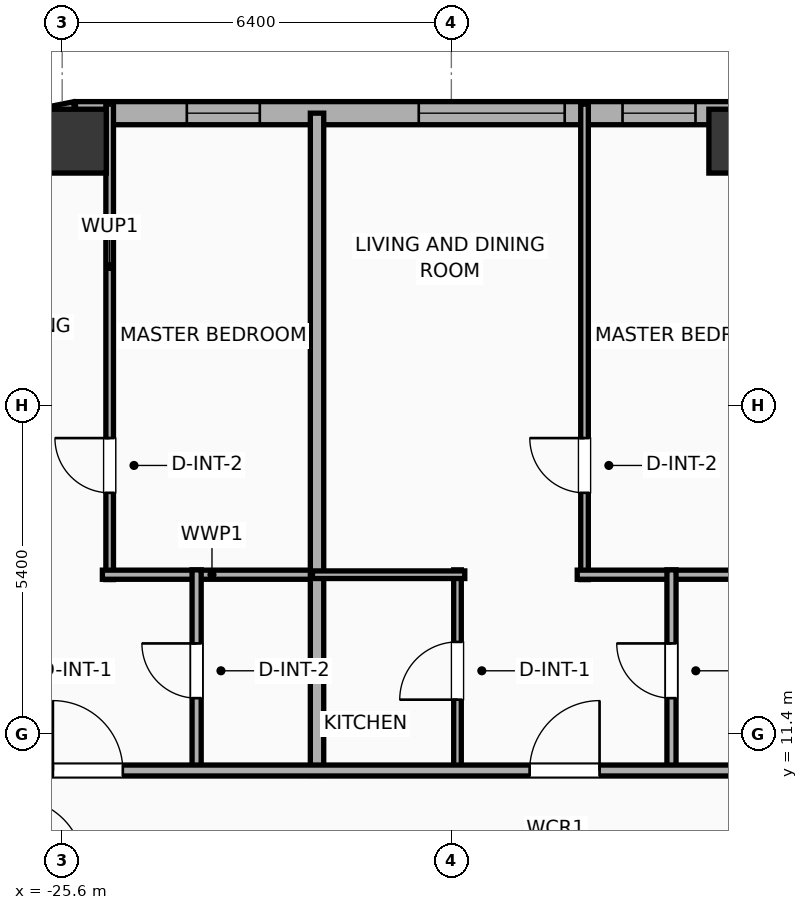
"""IFC4 building model, lengths in metres.
Left out: names, types, materials, properties, quantities, classifications, styles, units other than length and angle.
Written with IfcOpenShell. Run it as: python <this file> out.ifc"""

import sys

from ifc_helpers import new_model, si_unit, direction, frame, frame_2d, origin, origin_2d, place, context, subcontext, project, spatial, rectangle, hollow_rectangle, extrude, element, fill, save


model = new_model("IFC4")
c1 = context("Model", 3, precision=1e-05, world=origin(), true_north=direction((0.0, 1.0)))
c2 = subcontext(c1, "Body", "Model", "MODEL_VIEW")
j1 = project(units=[si_unit("LENGTHUNIT", "METRE"), si_unit("PLANEANGLEUNIT", "RADIAN")], contexts=[c1])
p1 = place(None, origin())
s1 = spatial("IfcSite", under=j1, at=p1, CompositionType="ELEMENT")
p2 = place(p1, origin())
s2 = spatial("IfcBuilding", under=s1, at=p2, CompositionType="ELEMENT")
p3 = place(p2, frame((0.0, 0.0, 109.2)))
s3 = spatial("IfcBuildingStorey", under=s2, at=p3, CompositionType="ELEMENT", Elevation=109.2)
for number, where, z_axis, x_axis in (
    (1, (-14.44, 21.15, 0.0), (0.0, 0.0, 1.0), (1.0, 0.0, 0.0)),
    (2, (-25.4, 21.15, 0.0), (0.0, 0.0, 1.0), (1.0, 0.0, 0.0)),
):
    element("IfcColumn", number, at=place(p3, frame(where, z_axis=z_axis, x_axis=x_axis)), inside=s3, PredefinedType="COLUMN", context=c2, shape_type="SweptSolid", body=[
        extrude(hollow_rectangle(XDim=1.05, YDim=1.05, WallThickness=0.036, at=origin_2d()), origin(), (0.0, 0.0, 1.0), 3.9),
    ])
p4 = place(p3, frame((-26.857, 21.316, 0.0), z_axis=(0.0, 0.0, 1.0), x_axis=(0.980755066645, 0.195242155415, 0.0)))
e3 = element("IfcWall", 3, at=p4, inside=s3, PredefinedType="ELEMENTEDWALL", context=c2, shape_type="SweptSolid", body=[
    extrude(rectangle(XDim=1.504, YDim=0.38, at=frame_2d((0.752, 0.0))), origin(), (0.0, 0.0, 1.0), 3.65),
])
p5 = place(p3, frame((-25.381, 21.61, 0.0), z_axis=(0.0, 0.0, 1.0), x_axis=(1.0, 0.0, 0.0)))
e4 = element("IfcWall", 4, at=p5, inside=s3, PredefinedType="ELEMENTEDWALL", context=c2, shape_type="SweptSolid", body=[
    extrude(rectangle(XDim=54.763, YDim=0.38, at=frame_2d((27.381, 0.0))), origin(), (0.0, 0.0, 1.0), 3.65),
])
p6 = place(p5, frame((5.645, 0.0, 0.75)))
e5 = element("IfcOpeningElement", 5, at=p6, cuts=e4, PredefinedType="OPENING", context=c2, shape_type="SweptSolid", body=[
    extrude(rectangle(XDim=2.4, YDim=2.1, at=frame_2d((1.2, 1.05))), frame((0.0, 0.2, 0.0), z_axis=(0.0, -1.0, 0.0), x_axis=(1.0, 0.0, 0.0)), (0.0, 0.0, 1.0), 0.4),
])
p7 = place(p5, frame((45.067, 0.0, 0.75)))
e6 = element("IfcOpeningElement", 6, at=p7, cuts=e4, PredefinedType="OPENING", context=c2, shape_type="SweptSolid", body=[
    extrude(rectangle(XDim=2.4, YDim=2.1, at=frame_2d((1.2, 1.05))), frame((0.0, 0.2, 0.0), z_axis=(0.0, -1.0, 0.0), x_axis=(1.0, 0.0, 0.0)), (0.0, 0.0, 1.0), 0.4),
])
p8 = place(p5, frame((1.831, 0.0, 0.75)))
e7 = element("IfcOpeningElement", 7, at=p8, cuts=e4, PredefinedType="OPENING", context=c2, shape_type="SweptSolid", body=[
    extrude(rectangle(XDim=1.2, YDim=2.05, at=frame_2d((0.6, 1.025))), frame((0.0, 0.2, 0.0), z_axis=(0.0, -1.0, 0.0), x_axis=(1.0, 0.0, 0.0)), (0.0, 0.0, 1.0), 0.4),
])
p9 = place(p5, frame((8.996, 0.0, 0.75)))
e8 = element("IfcOpeningElement", 8, at=p9, cuts=e4, PredefinedType="OPENING", context=c2, shape_type="SweptSolid", body=[
    extrude(rectangle(XDim=1.2, YDim=2.05, at=frame_2d((0.6, 1.025))), frame((0.0, 0.2, 0.0), z_axis=(0.0, -1.0, 0.0), x_axis=(1.0, 0.0, 0.0)), (0.0, 0.0, 1.0), 0.4),
])
p10 = place(p5, frame((15.102, 0.0, 0.75)))
e9 = element("IfcOpeningElement", 9, at=p10, cuts=e4, PredefinedType="OPENING", context=c2, shape_type="SweptSolid", body=[
    extrude(rectangle(XDim=1.2, YDim=2.05, at=frame_2d((0.6, 1.025))), frame((0.0, 0.2, 0.0), z_axis=(0.0, -1.0, 0.0), x_axis=(1.0, 0.0, 0.0)), (0.0, 0.0, 1.0), 0.4),
])
p11 = place(p5, frame((12.352, 0.0, 0.75)))
e10 = element("IfcOpeningElement", 10, at=p11, cuts=e4, PredefinedType="OPENING", context=c2, shape_type="SweptSolid", body=[
    extrude(rectangle(XDim=1.2, YDim=2.05, at=frame_2d((0.6, 1.025))), frame((0.0, 0.2, 0.0), z_axis=(0.0, -1.0, 0.0), x_axis=(1.0, 0.0, 0.0)), (0.0, 0.0, 1.0), 0.4),
])
p12 = place(p5, frame((19.936, 0.0, 0.75)))
e11 = element("IfcOpeningElement", 11, at=p12, cuts=e4, PredefinedType="OPENING", context=c2, shape_type="SweptSolid", body=[
    extrude(rectangle(XDim=1.2, YDim=2.05, at=frame_2d((0.6, 1.025))), frame((0.0, 0.2, 0.0), z_axis=(0.0, -1.0, 0.0), x_axis=(1.0, 0.0, 0.0)), (0.0, 0.0, 1.0), 0.4),
])
p13 = place(p5, frame((17.786, 0.0, 0.75)))
e12 = element("IfcOpeningElement", 12, at=p13, cuts=e4, PredefinedType="OPENING", context=c2, shape_type="SweptSolid", body=[
    extrude(rectangle(XDim=1.2, YDim=2.05, at=frame_2d((0.6, 1.025))), frame((0.0, 0.2, 0.0), z_axis=(0.0, -1.0, 0.0), x_axis=(1.0, 0.0, 0.0)), (0.0, 0.0, 1.0), 0.4),
])
p14 = place(p5, frame((23.826, 0.0, 0.75)))
e13 = element("IfcOpeningElement", 13, at=p14, cuts=e4, PredefinedType="OPENING", context=c2, shape_type="SweptSolid", body=[
    extrude(rectangle(XDim=1.2, YDim=2.05, at=frame_2d((0.6, 1.025))), frame((0.0, 0.2, 0.0), z_axis=(0.0, -1.0, 0.0), x_axis=(1.0, 0.0, 0.0)), (0.0, 0.0, 1.0), 0.4),
])
p15 = place(p5, frame((26.576, 0.0, 0.75)))
e14 = element("IfcOpeningElement", 14, at=p15, cuts=e4, PredefinedType="OPENING", context=c2, shape_type="SweptSolid", body=[
    extrude(rectangle(XDim=1.2, YDim=2.05, at=frame_2d((0.6, 1.025))), frame((0.0, 0.2, 0.0), z_axis=(0.0, -1.0, 0.0), x_axis=(1.0, 0.0, 0.0)), (0.0, 0.0, 1.0), 0.4),
])
p16 = place(p5, frame((30.431, 0.0, 0.75)))
e15 = element("IfcOpeningElement", 15, at=p16, cuts=e4, PredefinedType="OPENING", context=c2, shape_type="SweptSolid", body=[
    extrude(rectangle(XDim=1.2, YDim=2.05, at=frame_2d((0.6, 1.025))), frame((0.0, 0.2, 0.0), z_axis=(0.0, -1.0, 0.0), x_axis=(1.0, 0.0, 0.0)), (0.0, 0.0, 1.0), 0.4),
])
p17 = place(p5, frame((38.581, 0.0, 0.75)))
e16 = element("IfcOpeningElement", 16, at=p17, cuts=e4, PredefinedType="OPENING", context=c2, shape_type="SweptSolid", body=[
    extrude(rectangle(XDim=1.2, YDim=2.05, at=frame_2d((0.6, 1.025))), frame((0.0, 0.2, 0.0), z_axis=(0.0, -1.0, 0.0), x_axis=(1.0, 0.0, 0.0)), (0.0, 0.0, 1.0), 0.4),
])
p18 = place(p5, frame((34.786, 0.0, 0.75)))
e17 = element("IfcOpeningElement", 17, at=p18, cuts=e4, PredefinedType="OPENING", context=c2, shape_type="SweptSolid", body=[
    extrude(rectangle(XDim=1.2, YDim=2.05, at=frame_2d((0.6, 1.025))), frame((0.0, 0.2, 0.0), z_axis=(0.0, -1.0, 0.0), x_axis=(1.0, 0.0, 0.0)), (0.0, 0.0, 1.0), 0.4),
])
p19 = place(p5, frame((41.876, 0.0, 0.75)))
e18 = element("IfcOpeningElement", 18, at=p19, cuts=e4, PredefinedType="OPENING", context=c2, shape_type="SweptSolid", body=[
    extrude(rectangle(XDim=1.2, YDim=2.05, at=frame_2d((0.6, 1.025))), frame((0.0, 0.2, 0.0), z_axis=(0.0, -1.0, 0.0), x_axis=(1.0, 0.0, 0.0)), (0.0, 0.0, 1.0), 0.4),
])
p20 = place(p5, frame((49.385, 0.0, 0.75)))
e19 = element("IfcOpeningElement", 19, at=p20, cuts=e4, PredefinedType="OPENING", context=c2, shape_type="SweptSolid", body=[
    extrude(rectangle(XDim=1.2, YDim=2.05, at=frame_2d((0.6, 1.025))), frame((0.0, 0.2, 0.0), z_axis=(0.0, -1.0, 0.0), x_axis=(1.0, 0.0, 0.0)), (0.0, 0.0, 1.0), 0.4),
])
p21 = place(p5, frame((52.181, 0.0, 0.75)))
e20 = element("IfcOpeningElement", 20, at=p21, cuts=e4, PredefinedType="OPENING", context=c2, shape_type="SweptSolid", body=[
    extrude(rectangle(XDim=1.2, YDim=2.05, at=frame_2d((0.6, 1.025))), frame((0.0, 0.2, 0.0), z_axis=(0.0, -1.0, 0.0), x_axis=(1.0, 0.0, 0.0)), (0.0, 0.0, 1.0), 0.4),
])
p22 = place(p3, frame((-24.819, 13.94, 0.0), z_axis=(0.0, 0.0, 1.0), x_axis=(0.0, 1.0, 0.0)))
e21 = element("IfcWall", 21, at=p22, inside=s3, PredefinedType="PARTITIONING", context=c2, shape_type="SweptSolid", body=[
    extrude(rectangle(XDim=7.82, YDim=0.125, at=frame_2d((3.91, 0.0))), origin(), (0.0, 0.0, 1.0), 3.65),
])
p23 = place(p22, frame((1.427, 0.0, 0.0)))
e22 = element("IfcOpeningElement", 22, at=p23, cuts=e21, PredefinedType="OPENING", context=c2, shape_type="SweptSolid", body=[
    extrude(rectangle(XDim=0.9, YDim=2.05, at=frame_2d((0.45, 1.025))), frame((0.0, 0.073, 0.0), z_axis=(0.0, -1.0, 0.0), x_axis=(1.0, 0.0, 0.0)), (0.0, 0.0, 1.0), 0.145),
])
p24 = place(p3, frame((-24.939, 14.02, 0.0), z_axis=(0.0, 0.0, 1.0), x_axis=(1.0, 0.0, 0.0)))
e23 = element("IfcWall", 23, at=p24, inside=s3, PredefinedType="PLUMBINGWALL", context=c2, shape_type="SweptSolid", body=[
    extrude(rectangle(XDim=3.605, YDim=0.15, at=frame_2d((1.802, 0.0))), origin(), (0.0, 0.0, 1.0), 3.65),
])
p25 = place(p3, frame((-23.389, 10.78, 0.0), z_axis=(0.0, 0.0, 1.0), x_axis=(0.0, 1.0, 0.0)))
e24 = element("IfcWall", 24, at=p25, inside=s3, PredefinedType="PLUMBINGWALL", context=c2, shape_type="SweptSolid", body=[
    extrude(rectangle(XDim=3.32, YDim=0.15, at=frame_2d((1.66, 0.0))), origin(), (0.0, 0.0, 1.0), 3.65),
])
p26 = place(p25, frame((1.21, 0.0, 0.0)))
e25 = element("IfcOpeningElement", 25, at=p26, cuts=e24, PredefinedType="OPENING", context=c2, shape_type="SweptSolid", body=[
    extrude(rectangle(XDim=0.9, YDim=2.05, at=frame_2d((0.45, 1.025))), frame((0.0, 0.085, 0.0), z_axis=(0.0, -1.0, 0.0), x_axis=(1.0, 0.0, 0.0)), (0.0, 0.0, 1.0), 0.17),
])
p27 = place(p3, frame((-21.409, 10.72, 0.0), z_axis=(0.0, 0.0, 1.0), x_axis=(0.0, 1.0, 0.0)))
e26 = element("IfcWall", 26, at=p27, inside=s3, PredefinedType="PARTITIONING", context=c2, shape_type="SweptSolid", body=[
    extrude(rectangle(XDim=10.89, YDim=0.22, at=frame_2d((5.445, 0.0))), origin(), (0.0, 0.0, 1.0), 3.65),
])
p28 = place(p3, frame((-17.01, 13.94, 0.0), z_axis=(0.0, 0.0, 1.0), x_axis=(0.0, 1.0, 0.0)))
e27 = element("IfcWall", 27, at=p28, inside=s3, PredefinedType="PARTITIONING", context=c2, shape_type="SweptSolid", body=[
    extrude(rectangle(XDim=7.82, YDim=0.125, at=frame_2d((3.91, 0.0))), origin(), (0.0, 0.0, 1.0), 3.65),
])
p29 = place(p28, frame((1.427, 0.0, 0.0)))
e28 = element("IfcOpeningElement", 28, at=p29, cuts=e27, PredefinedType="OPENING", context=c2, shape_type="SweptSolid", body=[
    extrude(rectangle(XDim=0.9, YDim=2.05, at=frame_2d((0.45, 1.025))), frame((0.0, 0.073, 0.0), z_axis=(0.0, -1.0, 0.0), x_axis=(1.0, 0.0, 0.0)), (0.0, 0.0, 1.0), 0.145),
])
p30 = place(p3, frame((-17.13, 14.02, 0.0), z_axis=(0.0, 0.0, 1.0), x_axis=(1.0, 0.0, 0.0)))
e29 = element("IfcWall", 29, at=p30, inside=s3, PredefinedType="PLUMBINGWALL", context=c2, shape_type="SweptSolid", body=[
    extrude(rectangle(XDim=3.79, YDim=0.15, at=frame_2d((1.895, 0.0))), origin(), (0.0, 0.0, 1.0), 3.65),
])
p31 = place(p3, frame((-19.099, 10.78, 0.0), z_axis=(0.0, 0.0, 1.0), x_axis=(0.0, 1.0, 0.0)))
e30 = element("IfcWall", 30, at=p31, inside=s3, PredefinedType="PARTITIONING", context=c2, shape_type="SweptSolid", body=[
    extrude(rectangle(XDim=3.32, YDim=0.125, at=frame_2d((1.66, 0.0))), origin(), (0.0, 0.0, 1.0), 3.65),
])
p32 = place(p31, frame((1.185, 0.0, 0.0)))
e31 = element("IfcOpeningElement", 31, at=p32, cuts=e30, PredefinedType="OPENING", context=c2, shape_type="SweptSolid", body=[
    extrude(rectangle(XDim=0.95, YDim=2.05, at=frame_2d((0.475, 1.025))), frame((0.0, 0.073, 0.0), z_axis=(0.0, -1.0, 0.0), x_axis=(1.0, 0.0, 0.0)), (0.0, 0.0, 1.0), 0.145),
])
p33 = place(p3, frame((-21.484, 14.02, 0.0), z_axis=(0.0, 0.0, 1.0), x_axis=(1.0, 0.0, 0.0)))
e32 = element("IfcWall", 32, at=p33, inside=s3, PredefinedType="PARTITIONING", context=c2, shape_type="SweptSolid", body=[
    extrude(rectangle(XDim=2.505, YDim=0.125, at=frame_2d((1.252, 0.0))), origin(), (0.0, 0.0, 1.0), 3.65),
])
p34 = place(p3, frame((-15.58, 10.78, 0.0), z_axis=(0.0, 0.0, 1.0), x_axis=(0.0, 1.0, 0.0)))
e33 = element("IfcWall", 33, at=p34, inside=s3, PredefinedType="PLUMBINGWALL", context=c2, shape_type="SweptSolid", body=[
    extrude(rectangle(XDim=3.32, YDim=0.15, at=frame_2d((1.66, 0.0))), origin(), (0.0, 0.0, 1.0), 3.65),
])
p35 = place(p34, frame((1.21, 0.0, 0.0)))
e34 = element("IfcOpeningElement", 34, at=p35, cuts=e33, PredefinedType="OPENING", context=c2, shape_type="SweptSolid", body=[
    extrude(rectangle(XDim=0.9, YDim=2.05, at=frame_2d((0.45, 1.025))), frame((0.0, 0.085, 0.0), z_axis=(0.0, -1.0, 0.0), x_axis=(1.0, 0.0, 0.0)), (0.0, 0.0, 1.0), 0.17),
])
p36 = place(p3, frame((-29.21, 10.8, 0.0), z_axis=(0.0, 0.0, 1.0), x_axis=(1.0, 0.0, 0.0)))
e35 = element("IfcWall", 35, at=p36, inside=s3, PredefinedType="PARTITIONING", context=c2, shape_type="SweptSolid", body=[
    extrude(rectangle(XDim=62.42, YDim=0.18, at=frame_2d((31.21, 0.0))), origin(), (0.0, 0.0, 1.0), 3.65),
])
p37 = place(p36, frame((3.457, 0.0, 0.0)))
e36 = element("IfcOpeningElement", 36, at=p37, cuts=e35, PredefinedType="OPENING", context=c2, shape_type="SweptSolid", body=[
    extrude(rectangle(XDim=1.15, YDim=2.05, at=frame_2d((0.575, 1.025))), frame((0.0, 0.1, 0.0), z_axis=(0.0, -1.0, 0.0), x_axis=(1.0, 0.0, 0.0)), (0.0, 0.0, 1.0), 0.2),
])
p38 = place(p36, frame((11.297, 0.0, 0.0)))
e37 = element("IfcOpeningElement", 37, at=p38, cuts=e35, PredefinedType="OPENING", context=c2, shape_type="SweptSolid", body=[
    extrude(rectangle(XDim=1.15, YDim=2.05, at=frame_2d((0.575, 1.025))), frame((0.0, 0.1, 0.0), z_axis=(0.0, -1.0, 0.0), x_axis=(1.0, 0.0, 0.0)), (0.0, 0.0, 1.0), 0.2),
])
p39 = place(p36, frame((18.925, 0.0, 0.0)))
e38 = element("IfcOpeningElement", 38, at=p39, cuts=e35, PredefinedType="OPENING", context=c2, shape_type="SweptSolid", body=[
    extrude(rectangle(XDim=1.15, YDim=2.05, at=frame_2d((0.575, 1.025))), frame((0.0, 0.1, 0.0), z_axis=(0.0, -1.0, 0.0), x_axis=(1.0, 0.0, 0.0)), (0.0, 0.0, 1.0), 0.2),
])
p40 = place(p36, frame((24.362, 0.0, 0.0)))
e39 = element("IfcOpeningElement", 39, at=p40, cuts=e35, PredefinedType="OPENING", context=c2, shape_type="SweptSolid", body=[
    extrude(rectangle(XDim=1.15, YDim=2.05, at=frame_2d((0.575, 1.025))), frame((0.0, 0.1, 0.0), z_axis=(0.0, -1.0, 0.0), x_axis=(1.0, 0.0, 0.0)), (0.0, 0.0, 1.0), 0.2),
])
p41 = place(p36, frame((27.708, 0.0, 0.0)))
e40 = element("IfcOpeningElement", 40, at=p41, cuts=e35, PredefinedType="OPENING", context=c2, shape_type="SweptSolid", body=[
    extrude(rectangle(XDim=1.15, YDim=2.05, at=frame_2d((0.575, 1.025))), frame((0.0, 0.1, 0.0), z_axis=(0.0, -1.0, 0.0), x_axis=(1.0, 0.0, 0.0)), (0.0, 0.0, 1.0), 0.2),
])
p42 = place(p36, frame((34.618, 0.0, 0.0)))
e41 = element("IfcOpeningElement", 41, at=p42, cuts=e35, PredefinedType="OPENING", context=c2, shape_type="SweptSolid", body=[
    extrude(rectangle(XDim=0.9, YDim=2.05, at=frame_2d((0.45, 1.025))), frame((0.0, 0.1, 0.0), z_axis=(0.0, -1.0, 0.0), x_axis=(1.0, 0.0, 0.0)), (0.0, 0.0, 1.0), 0.2),
])
p43 = place(p36, frame((43.106, 0.0, 0.0)))
e42 = element("IfcOpeningElement", 42, at=p43, cuts=e35, PredefinedType="OPENING", context=c2, shape_type="SweptSolid", body=[
    extrude(rectangle(XDim=1.15, YDim=2.05, at=frame_2d((0.575, 1.025))), frame((0.0, 0.1, 0.0), z_axis=(0.0, -1.0, 0.0), x_axis=(1.0, 0.0, 0.0)), (0.0, 0.0, 1.0), 0.2),
])
p44 = place(p36, frame((51.777, 0.0, 0.0)))
e43 = element("IfcOpeningElement", 43, at=p44, cuts=e35, PredefinedType="OPENING", context=c2, shape_type="SweptSolid", body=[
    extrude(rectangle(XDim=0.9, YDim=2.05, at=frame_2d((0.45, 1.025))), frame((0.0, 0.1, 0.0), z_axis=(0.0, -1.0, 0.0), x_axis=(1.0, 0.0, 0.0)), (0.0, 0.0, 1.0), 0.2),
])
p45 = place(p36, frame((58.718, 0.0, 0.0)))
e44 = element("IfcOpeningElement", 44, at=p45, cuts=e35, PredefinedType="OPENING", context=c2, shape_type="SweptSolid", body=[
    extrude(rectangle(XDim=0.9, YDim=2.05, at=frame_2d((0.45, 1.025))), frame((0.0, 0.1, 0.0), z_axis=(0.0, -1.0, 0.0), x_axis=(1.0, 0.0, 0.0)), (0.0, 0.0, 1.0), 0.2),
])
p46 = place(p6, origin())
e45 = element("IfcWindow", 45, at=p46, inside=s3, PartitioningType="SINGLE_PANEL", PredefinedType="WINDOW", context=c2, shape_type="SweptSolid", body=[
    extrude(rectangle(XDim=2.4, YDim=2.1, at=frame_2d((1.2, 1.05))), frame((0.0, 0.03, 0.0), z_axis=(0.0, -1.0, 0.0), x_axis=(1.0, 0.0, 0.0)), (0.0, 0.0, 1.0), 0.06),
])
fill(e5, e45)
p47 = place(p8, origin())
e46 = element("IfcWindow", 46, at=p47, inside=s3, PartitioningType="SINGLE_PANEL", PredefinedType="WINDOW", context=c2, shape_type="SweptSolid", body=[
    extrude(rectangle(XDim=1.2, YDim=2.05, at=frame_2d((0.6, 1.025))), frame((0.0, 0.03, 0.0), z_axis=(0.0, -1.0, 0.0), x_axis=(1.0, 0.0, 0.0)), (0.0, 0.0, 1.0), 0.06),
])
fill(e7, e46)
p48 = place(p9, origin())
e47 = element("IfcWindow", 47, at=p48, inside=s3, PartitioningType="SINGLE_PANEL", PredefinedType="WINDOW", context=c2, shape_type="SweptSolid", body=[
    extrude(rectangle(XDim=1.2, YDim=2.05, at=frame_2d((0.6, 1.025))), frame((0.0, 0.03, 0.0), z_axis=(0.0, -1.0, 0.0), x_axis=(1.0, 0.0, 0.0)), (0.0, 0.0, 1.0), 0.06),
])
fill(e8, e47)
p49 = place(p23, origin())
e48 = element("IfcDoor", 48, at=p49, inside=s3, OperationType="SINGLE_SWING_RIGHT", PredefinedType="DOOR", context=c2, shape_type="SweptSolid", body=[
    extrude(rectangle(XDim=0.9, YDim=2.05, at=frame_2d((0.45, 1.025))), frame((0.0, 0.025, 0.0), z_axis=(0.0, -1.0, 0.0), x_axis=(1.0, 0.0, 0.0)), (0.0, 0.0, 1.0), 0.05),
])
fill(e22, e48)
p50 = place(p26, origin())
e49 = element("IfcDoor", 49, at=p50, inside=s3, OperationType="SINGLE_SWING_RIGHT", PredefinedType="DOOR", context=c2, shape_type="SweptSolid", body=[
    extrude(rectangle(XDim=0.9, YDim=2.05, at=frame_2d((0.45, 1.025))), frame((0.0, 0.025, 0.0), z_axis=(0.0, -1.0, 0.0), x_axis=(1.0, 0.0, 0.0)), (0.0, 0.0, 1.0), 0.05),
])
fill(e25, e49)
p51 = place(p29, origin())
e50 = element("IfcDoor", 50, at=p51, inside=s3, OperationType="SINGLE_SWING_RIGHT", PredefinedType="DOOR", context=c2, shape_type="SweptSolid", body=[
    extrude(rectangle(XDim=0.9, YDim=2.05, at=frame_2d((0.45, 1.025))), frame((0.0, 0.025, 0.0), z_axis=(0.0, -1.0, 0.0), x_axis=(1.0, 0.0, 0.0)), (0.0, 0.0, 1.0), 0.05),
])
fill(e28, e50)
p52 = place(p32, origin())
e51 = element("IfcDoor", 51, at=p52, inside=s3, OperationType="SINGLE_SWING_LEFT", PredefinedType="DOOR", context=c2, shape_type="SweptSolid", body=[
    extrude(rectangle(XDim=0.95, YDim=2.05, at=frame_2d((0.475, 1.025))), frame((0.0, 0.025, 0.0), z_axis=(0.0, -1.0, 0.0), x_axis=(1.0, 0.0, 0.0)), (0.0, 0.0, 1.0), 0.05),
])
fill(e31, e51)
p53 = place(p35, origin())
e52 = element("IfcDoor", 52, at=p53, inside=s3, OperationType="SINGLE_SWING_RIGHT", PredefinedType="DOOR", context=c2, shape_type="SweptSolid", body=[
    extrude(rectangle(XDim=0.9, YDim=2.05, at=frame_2d((0.45, 1.025))), frame((0.0, 0.025, 0.0), z_axis=(0.0, -1.0, 0.0), x_axis=(1.0, 0.0, 0.0)), (0.0, 0.0, 1.0), 0.05),
])
fill(e34, e52)
p54 = place(p37, origin())
e53 = element("IfcDoor", 53, at=p54, inside=s3, OperationType="SINGLE_SWING_LEFT", PredefinedType="DOOR", context=c2, shape_type="SweptSolid", body=[
    extrude(rectangle(XDim=1.15, YDim=2.05, at=frame_2d((0.575, 1.025))), frame((0.0, 0.025, 0.0), z_axis=(0.0, -1.0, 0.0), x_axis=(1.0, 0.0, 0.0)), (0.0, 0.0, 1.0), 0.05),
])
fill(e36, e53)
p55 = place(p38, origin())
e54 = element("IfcDoor", 54, at=p55, inside=s3, OperationType="SINGLE_SWING_RIGHT", PredefinedType="DOOR", context=c2, shape_type="SweptSolid", body=[
    extrude(rectangle(XDim=1.15, YDim=2.05, at=frame_2d((0.575, 1.025))), frame((0.0, 0.025, 0.0), z_axis=(0.0, -1.0, 0.0), x_axis=(1.0, 0.0, 0.0)), (0.0, 0.0, 1.0), 0.05),
])
fill(e37, e54)
save(model, sys.argv[1])
